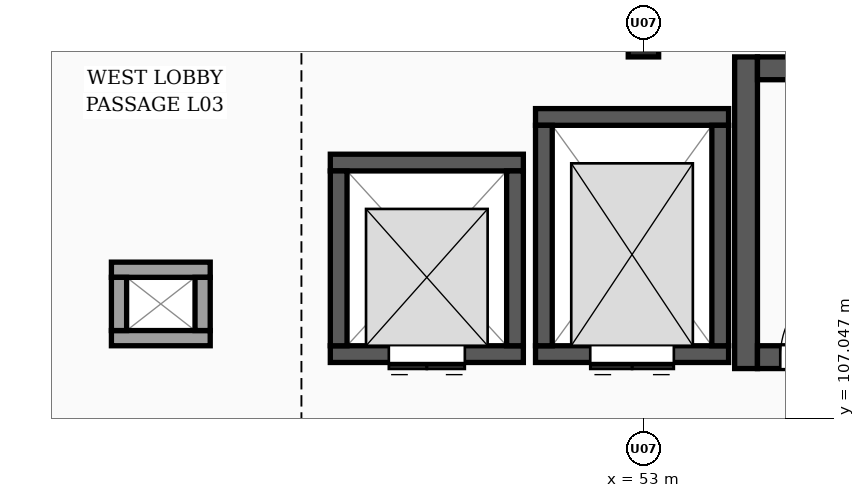
"""IFC4 building model, lengths in metres.
Left out: names, types, materials, properties, quantities, classifications, styles, units other than length and angle.
Written with IfcOpenShell. Run it as: python <this file> out.ifc"""

import sys

from ifc_helpers import new_model, si_unit, direction, frame, frame_2d, origin, origin_2d, place, context, subcontext, project, spatial, rectangle, extrude, element, fill, save


model = new_model("IFC4")
c1 = context("Model", 3, precision=1e-05, world=origin(), true_north=direction((0.0, 1.0)))
c2 = subcontext(c1, "Body", "Model", "MODEL_VIEW")
j1 = project(units=[si_unit("LENGTHUNIT", "METRE"), si_unit("PLANEANGLEUNIT", "RADIAN")], contexts=[c1])
p1 = place(None, origin())
s1 = spatial("IfcSite", under=j1, at=p1, CompositionType="ELEMENT")
p2 = place(p1, origin())
s2 = spatial("IfcBuilding", under=s1, at=p2, CompositionType="ELEMENT")
p3 = place(p2, frame((0.0, 0.0, 12.3)))
s3 = spatial("IfcBuildingStorey", under=s2, at=p3, CompositionType="ELEMENT", Elevation=12.3)
p4 = place(p3, frame((53.0, 112.0, 0.0), z_axis=(0.0, 0.0, 1.0), x_axis=(1.0, 0.0, 0.0)))
e1 = element("IfcColumn", 1, at=p4, inside=s3, PredefinedType="COLUMN", context=c2, shape_type="SweptSolid", body=[
    extrude(rectangle(XDim=0.4, YDim=0.4, at=origin_2d()), origin(), (0.0, 0.0, 1.0), 3.9),
])
p5 = place(p3, frame((54.35, 107.7, 0.0), z_axis=(0.0, 0.0, 1.0), x_axis=(0.0, 1.0, 0.0)))
e2 = element("IfcWall", 2, at=p5, inside=s3, PredefinedType="SHEAR", context=c2, shape_type="SweptSolid", body=[
    extrude(rectangle(XDim=4.1, YDim=0.3, at=frame_2d((2.05, 0.0))), origin(), (0.0, 0.0, 1.0), 3.65),
])
p6 = place(p3, frame((54.5, 107.85, 0.0), z_axis=(0.0, 0.0, 1.0), x_axis=(1.0, 0.0, 0.0)))
e3 = element("IfcWall", 3, at=p6, inside=s3, PredefinedType="SHEAR", context=c2, shape_type="SweptSolid", body=[
    extrude(rectangle(XDim=6.8, YDim=0.3, at=frame_2d((3.4, 0.0))), origin(), (0.0, 0.0, 1.0), 3.65),
])
p7 = place(p6, frame((0.3, 0.0, 0.0)))
e4 = element("IfcOpeningElement", 4, at=p7, cuts=e3, PredefinedType="OPENING", context=c2, shape_type="SweptSolid", body=[
    extrude(rectangle(XDim=1.1, YDim=2.15, at=frame_2d((0.55, 1.075))), frame((0.0, 0.16, 0.0), z_axis=(0.0, -1.0, 0.0), x_axis=(1.0, 0.0, 0.0)), (0.0, 0.0, 1.0), 0.32),
])
p8 = place(p3, frame((61.3, 111.65, 0.0), z_axis=(0.0, 0.0, 1.0), x_axis=(-1.0, 0.0, 0.0)))
e5 = element("IfcWall", 5, at=p8, inside=s3, PredefinedType="SHEAR", context=c2, shape_type="SweptSolid", body=[
    extrude(rectangle(XDim=6.8, YDim=0.3, at=frame_2d((3.4, 0.0))), origin(), (0.0, 0.0, 1.0), 3.65),
])
p9 = place(p3, frame((54.12, 107.89, 0.0), z_axis=(0.0, 0.0, 1.0), x_axis=(-1.0, 0.0, 0.0)))
e6 = element("IfcWall", 6, at=p9, inside=s3, PredefinedType="SHEAR", context=c2, shape_type="SweptSolid", body=[
    extrude(rectangle(XDim=2.54, YDim=0.22, at=frame_2d((1.27, 0.0))), origin(), (0.0, 0.0, 1.0), 3.65),
])
p10 = place(p9, frame((0.72, 0.0, 0.0)))
e7 = element("IfcOpeningElement", 7, at=p10, cuts=e6, PredefinedType="OPENING", context=c2, shape_type="SweptSolid", body=[
    extrude(rectangle(XDim=1.1, YDim=2.15, at=frame_2d((0.55, 1.075))), frame((0.0, 0.12, 0.0), z_axis=(0.0, -1.0, 0.0), x_axis=(1.0, 0.0, 0.0)), (0.0, 0.0, 1.0), 0.24),
])
p11 = place(p3, frame((51.58, 111.01, 0.0), z_axis=(0.0, 0.0, 1.0), x_axis=(1.0, 0.0, 0.0)))
e8 = element("IfcWall", 8, at=p11, inside=s3, PredefinedType="SHEAR", context=c2, shape_type="SweptSolid", body=[
    extrude(rectangle(XDim=2.54, YDim=0.22, at=frame_2d((1.27, 0.0))), origin(), (0.0, 0.0, 1.0), 3.65),
])
for number, where, z_axis, x_axis in (
    (9, (51.69, 108.0, 0.0), (0.0, 0.0, 1.0), (0.0, 1.0, 0.0)),
    (10, (54.01, 110.9, 0.0), (0.0, 0.0, 1.0), (0.0, -1.0, 0.0)),
):
    element("IfcWall", number, at=place(p3, frame(where, z_axis=z_axis, x_axis=x_axis)), inside=s3, PredefinedType="SHEAR", context=c2, shape_type="SweptSolid", body=[
        extrude(rectangle(XDim=2.9, YDim=0.22, at=frame_2d((1.45, 0.0))), origin(), (0.0, 0.0, 1.0), 3.65),
    ])
p12 = place(p3, frame((51.42, 107.89, 0.0), z_axis=(0.0, 0.0, 1.0), x_axis=(-1.0, 0.0, 0.0)))
e11 = element("IfcWall", 11, at=p12, inside=s3, PredefinedType="SHEAR", context=c2, shape_type="SweptSolid", body=[
    extrude(rectangle(XDim=2.54, YDim=0.22, at=frame_2d((1.27, 0.0))), origin(), (0.0, 0.0, 1.0), 3.65),
])
p13 = place(p12, frame((0.77, 0.0, 0.0)))
e12 = element("IfcOpeningElement", 12, at=p13, cuts=e11, PredefinedType="OPENING", context=c2, shape_type="SweptSolid", body=[
    extrude(rectangle(XDim=1.0, YDim=2.15, at=frame_2d((0.5, 1.075))), frame((0.0, 0.12, 0.0), z_axis=(0.0, -1.0, 0.0), x_axis=(1.0, 0.0, 0.0)), (0.0, 0.0, 1.0), 0.24),
])
p14 = place(p3, frame((48.88, 110.41, 0.0), z_axis=(0.0, 0.0, 1.0), x_axis=(1.0, 0.0, 0.0)))
e13 = element("IfcWall", 13, at=p14, inside=s3, PredefinedType="SHEAR", context=c2, shape_type="SweptSolid", body=[
    extrude(rectangle(XDim=2.54, YDim=0.22, at=frame_2d((1.27, 0.0))), origin(), (0.0, 0.0, 1.0), 3.65),
])
for number, where, z_axis, x_axis in (
    (14, (48.99, 108.0, 0.0), (0.0, 0.0, 1.0), (0.0, 1.0, 0.0)),
    (15, (51.31, 110.3, 0.0), (0.0, 0.0, 1.0), (0.0, -1.0, 0.0)),
):
    element("IfcWall", number, at=place(p3, frame(where, z_axis=z_axis, x_axis=x_axis)), inside=s3, PredefinedType="SHEAR", context=c2, shape_type="SweptSolid", body=[
        extrude(rectangle(XDim=2.3, YDim=0.22, at=frame_2d((1.15, 0.0))), origin(), (0.0, 0.0, 1.0), 3.65),
    ])
for number, where, z_axis, x_axis in (
    (16, (47.3, 108.1, 0.0), (0.0, 0.0, 1.0), (-1.0, 0.0, 0.0)),
    (17, (46.0, 109.0, 0.0), (0.0, 0.0, 1.0), (1.0, 0.0, 0.0)),
):
    element("IfcWall", number, at=place(p3, frame(where, z_axis=z_axis, x_axis=x_axis)), inside=s3, PredefinedType="PARTITIONING", context=c2, shape_type="SweptSolid", body=[
        extrude(rectangle(XDim=1.3, YDim=0.2, at=frame_2d((0.65, 0.0))), origin(), (0.0, 0.0, 1.0), 3.65),
    ])
p15 = place(p3, frame((46.1, 108.2, 0.0), z_axis=(0.0, 0.0, 1.0), x_axis=(0.0, 1.0, 0.0)))
e18 = element("IfcWall", 18, at=p15, inside=s3, PredefinedType="PARTITIONING", context=c2, shape_type="SweptSolid", body=[
    extrude(rectangle(XDim=0.7, YDim=0.2, at=frame_2d((0.35, 0.0))), origin(), (0.0, 0.0, 1.0), 3.65),
])
p16 = place(p3, frame((47.2, 108.9, 0.0), z_axis=(0.0, 0.0, 1.0), x_axis=(0.0, -1.0, 0.0)))
e19 = element("IfcWall", 19, at=p16, inside=s3, PredefinedType="PARTITIONING", context=c2, shape_type="SweptSolid", body=[
    extrude(rectangle(XDim=0.7, YDim=0.2, at=frame_2d((0.35, 0.0))), origin(), (0.0, 0.0, 1.0), 3.248),
])
p17 = place(p7, origin())
e20 = element("IfcDoor", 20, at=p17, inside=s3, OperationType="SINGLE_SWING_RIGHT", PredefinedType="DOOR", context=c2, shape_type="SweptSolid", body=[
    extrude(rectangle(XDim=1.1, YDim=2.15, at=frame_2d((0.55, 1.075))), frame((0.0, 0.025, 0.0), z_axis=(0.0, -1.0, 0.0), x_axis=(1.0, 0.0, 0.0)), (0.0, 0.0, 1.0), 0.05),
])
fill(e4, e20)
p18 = place(p10, origin())
e21 = element("IfcDoor", 21, at=p18, inside=s3, OperationType="DOUBLE_DOOR_SLIDING", PredefinedType="DOOR", context=c2, shape_type="SweptSolid", body=[
    extrude(rectangle(XDim=1.1, YDim=2.15, at=frame_2d((0.55, 1.075))), frame((0.0, 0.025, 0.0), z_axis=(0.0, -1.0, 0.0), x_axis=(1.0, 0.0, 0.0)), (0.0, 0.0, 1.0), 0.05),
])
fill(e7, e21)
p19 = place(p13, origin())
e22 = element("IfcDoor", 22, at=p19, inside=s3, OperationType="DOUBLE_DOOR_SLIDING", PredefinedType="DOOR", context=c2, shape_type="SweptSolid", body=[
    extrude(rectangle(XDim=1.0, YDim=2.15, at=frame_2d((0.5, 1.075))), frame((0.0, 0.025, 0.0), z_axis=(0.0, -1.0, 0.0), x_axis=(1.0, 0.0, 0.0)), (0.0, 0.0, 1.0), 0.05),
])
fill(e12, e22)
save(model, sys.argv[1])
